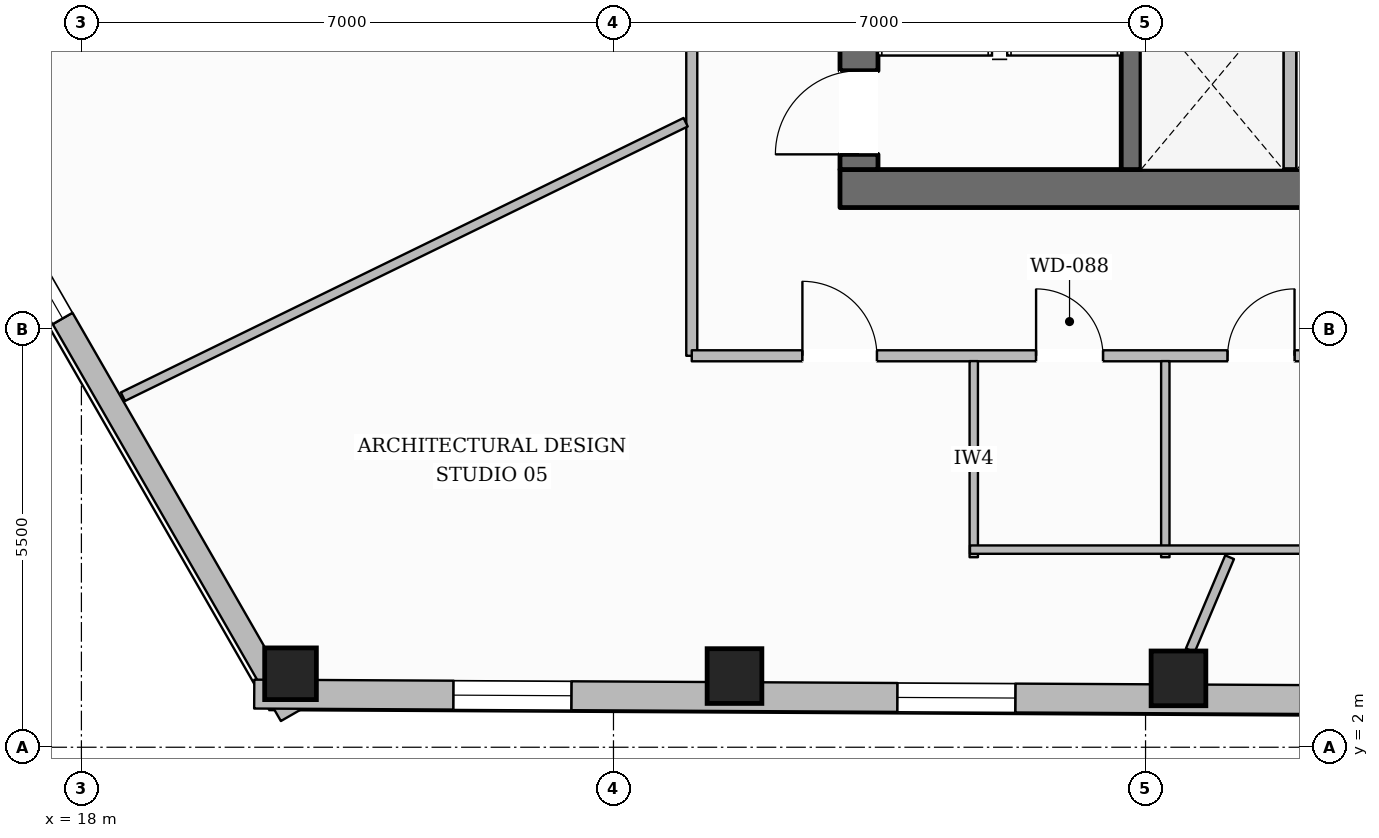
"""IFC4 building model, lengths in metres.
Left out: names, types, materials, properties, quantities, classifications, styles, units other than length and angle.
Written with IfcOpenShell. Run it as: python <this file> out.ifc"""

import sys

from ifc_helpers import new_model, si_unit, direction, frame, frame_2d, origin, origin_2d, place, context, subcontext, project, spatial, rectangle, hollow_rectangle, extrude, element, fill, save


model = new_model("IFC4")
c1 = context("Model", 3, precision=1e-05, world=origin(), true_north=direction((0.0, 1.0)))
c2 = subcontext(c1, "Body", "Model", "MODEL_VIEW")
j1 = project(units=[si_unit("LENGTHUNIT", "METRE"), si_unit("PLANEANGLEUNIT", "RADIAN")], contexts=[c1])
p1 = place(None, origin())
s1 = spatial("IfcSite", under=j1, at=p1, CompositionType="ELEMENT")
p2 = place(p1, origin())
s2 = spatial("IfcBuilding", under=s1, at=p2, CompositionType="ELEMENT")
p3 = place(p2, frame((0.0, 0.0, 108.6)))
s3 = spatial("IfcBuildingStorey", under=s2, at=p3, CompositionType="ELEMENT", Elevation=108.6)
p4 = place(p3, frame((27.98, 9.35, 0.0), z_axis=(0.0, 0.0, 1.0), x_axis=(1.0, 0.0, 0.0)))
e1 = element("IfcWall", 1, at=p4, inside=s3, PredefinedType="SOLIDWALL", context=c2, shape_type="SweptSolid", body=[
    extrude(rectangle(XDim=20.04, YDim=0.5, at=frame_2d((10.02, 0.0))), origin(), (0.0, 0.0, 1.0), 3.6),
])
p5 = place(p4, frame((10.52, 0.0, 0.0)))
e2 = element("IfcOpeningElement", 2, at=p5, cuts=e1, PredefinedType="OPENING", context=c2, shape_type="SweptSolid", body=[
    extrude(rectangle(XDim=1.4, YDim=2.2, at=frame_2d((0.7, 1.1))), frame((0.0, 0.26, 0.0), z_axis=(0.0, -1.0, 0.0), x_axis=(1.0, 0.0, 0.0)), (0.0, 0.0, 1.0), 0.52),
])
p6 = place(p3, frame((28.23, 9.6, 0.0), z_axis=(0.0, 0.0, 1.0), x_axis=(0.0, 1.0, 0.0)))
e3 = element("IfcWall", 3, at=p6, inside=s3, PredefinedType="SOLIDWALL", context=c2, shape_type="SweptSolid", body=[
    extrude(rectangle(XDim=13.0, YDim=0.5, at=frame_2d((6.5, 0.0))), origin(), (0.0, 0.0, 1.0), 3.6),
])
p7 = place(p6, frame((0.2, 0.0, 0.0)))
e4 = element("IfcOpeningElement", 4, at=p7, cuts=e3, PredefinedType="OPENING", context=c2, shape_type="SweptSolid", body=[
    extrude(rectangle(XDim=1.1, YDim=2.15, at=frame_2d((0.55, 1.075))), frame((0.0, 0.26, 0.0), z_axis=(0.0, -1.0, 0.0), x_axis=(1.0, 0.0, 0.0)), (0.0, 0.0, 1.0), 0.52),
])
p8 = place(p6, frame((8.4, 0.0, 0.0)))
e5 = element("IfcOpeningElement", 5, at=p8, cuts=e3, PredefinedType="OPENING", context=c2, shape_type="SweptSolid", body=[
    extrude(rectangle(XDim=0.9, YDim=2.1, at=frame_2d((0.45, 1.05))), frame((0.0, 0.26, 0.0), z_axis=(0.0, -1.0, 0.0), x_axis=(1.0, 0.0, 0.0)), (0.0, 0.0, 1.0), 0.52),
])
p9 = place(p3, frame((31.81, 9.6, 0.0), z_axis=(0.0, 0.0, 1.0), x_axis=(0.0, 1.0, 0.0)))
e6 = element("IfcWall", 6, at=p9, inside=s3, PredefinedType="SHEAR", context=c2, shape_type="SweptSolid", body=[
    extrude(rectangle(XDim=13.0, YDim=0.26, at=frame_2d((6.5, 0.0))), origin(), (0.0, 0.0, 1.0), 3.6),
])
p10 = place(p9, frame((10.925, 0.0, 0.0)))
e7 = element("IfcOpeningElement", 7, at=p10, cuts=e6, PredefinedType="OPENING", context=c2, shape_type="SweptSolid", body=[
    extrude(rectangle(XDim=1.25, YDim=2.25, at=frame_2d((0.625, 1.125))), frame((0.0, 0.14, 0.0), z_axis=(0.0, -1.0, 0.0), x_axis=(1.0, 0.0, 0.0)), (0.0, 0.0, 1.0), 0.28),
])
p11 = place(p3, frame((20.751, 2.967, 0.0), z_axis=(0.0, 0.0, 1.0), x_axis=(1.0, 0.0, 0.0)))
e8 = element("IfcColumn", 8, at=p11, inside=s3, PredefinedType="COLUMN", context=c2, shape_type="SweptSolid", body=[
    extrude(hollow_rectangle(XDim=0.68, YDim=0.68, WallThickness=0.03, at=origin_2d()), origin(), (0.0, 0.0, 1.0), 3.6),
])
for number, where, z_axis, x_axis in (
    (9, (26.592, 2.937, 0.0), (0.0, 0.0, 1.0), (1.0, 0.0, 0.0)),
    (10, (32.433, 2.906, 0.0), (0.0, 0.0, 1.0), (1.0, 0.0, 0.0)),
):
    element("IfcColumn", number, at=place(p3, frame(where, z_axis=z_axis, x_axis=x_axis)), inside=s3, PredefinedType="COLUMN", context=c2, shape_type="SweptSolid", body=[
        extrude(hollow_rectangle(XDim=0.72, YDim=0.72, WallThickness=0.032, at=origin_2d()), origin(), (0.0, 0.0, 1.0), 3.6),
    ])
p12 = place(p3, frame((20.754, 2.419, 0.0), z_axis=(0.0, 0.0, 1.0), x_axis=(-0.49837034912, 0.866964240969, 0.0)))
e11 = element("IfcWall", 11, at=p12, inside=s3, PredefinedType="STANDARD", context=c2, shape_type="SweptSolid", body=[
    extrude(rectangle(XDim=13.246, YDim=0.3, at=frame_2d((6.623, 0.0))), origin(), (0.0, 0.0, 1.0), 3.059),
])
p13 = place(p12, frame((6.023, 0.0, 0.65)))
e12 = element("IfcOpeningElement", 12, at=p13, cuts=e11, PredefinedType="OPENING", context=c2, shape_type="SweptSolid", body=[
    extrude(rectangle(XDim=1.2, YDim=1.7, at=frame_2d((0.6, 0.85))), frame((0.0, 0.16, 0.0), z_axis=(0.0, -1.0, 0.0), x_axis=(1.0, 0.0, 0.0)), (0.0, 0.0, 1.0), 0.32),
])
p14 = place(p3, frame((56.277, 2.512, 0.0), z_axis=(0.0, 0.0, 1.0), x_axis=(-0.999986545033, 0.005187461141, 0.0)))
e13 = element("IfcWall", 13, at=p14, inside=s3, PredefinedType="STANDARD", context=c2, shape_type="SweptSolid", body=[
    extrude(rectangle(XDim=36.004, YDim=0.38, at=frame_2d((18.002, 0.0))), origin(), (0.0, 0.0, 1.0), 3.059),
])
p15 = place(p14, frame((31.832, 0.0, 0.65)))
e14 = element("IfcOpeningElement", 14, at=p15, cuts=e13, PredefinedType="OPENING", context=c2, shape_type="SweptSolid", body=[
    extrude(rectangle(XDim=1.55, YDim=1.75, at=frame_2d((0.775, 0.875))), frame((0.0, 0.2, 0.0), z_axis=(0.0, -1.0, 0.0), x_axis=(1.0, 0.0, 0.0)), (0.0, 0.0, 1.0), 0.4),
])
p16 = place(p14, frame((25.991, 0.0, 0.65)))
e15 = element("IfcOpeningElement", 15, at=p16, cuts=e13, PredefinedType="OPENING", context=c2, shape_type="SweptSolid", body=[
    extrude(rectangle(XDim=1.55, YDim=1.75, at=frame_2d((0.775, 0.875))), frame((0.0, 0.2, 0.0), z_axis=(0.0, -1.0, 0.0), x_axis=(1.0, 0.0, 0.0)), (0.0, 0.0, 1.0), 0.4),
])
p17 = place(p14, frame((14.309, 0.0, 0.65)))
e16 = element("IfcOpeningElement", 16, at=p17, cuts=e13, PredefinedType="OPENING", context=c2, shape_type="SweptSolid", body=[
    extrude(rectangle(XDim=1.55, YDim=1.75, at=frame_2d((0.775, 0.875))), frame((0.0, 0.2, 0.0), z_axis=(0.0, -1.0, 0.0), x_axis=(1.0, 0.0, 0.0)), (0.0, 0.0, 1.0), 0.4),
])
p18 = place(p14, frame((8.468, 0.0, 0.65)))
e17 = element("IfcOpeningElement", 17, at=p18, cuts=e13, PredefinedType="OPENING", context=c2, shape_type="SweptSolid", body=[
    extrude(rectangle(XDim=1.55, YDim=1.75, at=frame_2d((0.775, 0.875))), frame((0.0, 0.2, 0.0), z_axis=(0.0, -1.0, 0.0), x_axis=(1.0, 0.0, 0.0)), (0.0, 0.0, 1.0), 0.4),
])
p19 = place(p14, frame((2.627, 0.0, 0.65)))
e18 = element("IfcOpeningElement", 18, at=p19, cuts=e13, PredefinedType="OPENING", context=c2, shape_type="SweptSolid", body=[
    extrude(rectangle(XDim=1.55, YDim=1.75, at=frame_2d((0.775, 0.875))), frame((0.0, 0.2, 0.0), z_axis=(0.0, -1.0, 0.0), x_axis=(1.0, 0.0, 0.0)), (0.0, 0.0, 1.0), 0.4),
])
p20 = place(p3, frame((33.9, 9.55, 0.0), z_axis=(0.0, 0.0, 1.0), x_axis=(0.0, 1.0, 0.0)))
e19 = element("IfcWall", 19, at=p20, inside=s3, PredefinedType="PARTITIONING", context=c2, shape_type="SweptSolid", body=[
    extrude(rectangle(XDim=2.29, YDim=0.165, at=frame_2d((1.145, 0.0))), origin(), (0.0, 0.0, 1.0), 3.6),
])
p21 = place(p3, frame((26.03, 25.05, 0.0), z_axis=(0.0, 0.0, 1.0), x_axis=(0.0, -1.0, 0.0)))
e20 = element("IfcWall", 20, at=p21, inside=s3, PredefinedType="PARTITIONING", context=c2, shape_type="SweptSolid", body=[
    extrude(rectangle(XDim=17.9, YDim=0.145, at=frame_2d((8.95, 0.0))), origin(), (0.0, 0.0, 1.0), 3.288),
])
p22 = place(p21, frame((7.016, 0.0, 0.0)))
e21 = element("IfcOpeningElement", 21, at=p22, cuts=e20, PredefinedType="OPENING", context=c2, shape_type="SweptSolid", body=[
    extrude(rectangle(XDim=1.4, YDim=2.2, at=frame_2d((0.7, 1.1))), frame((0.0, 0.083, 0.0), z_axis=(0.0, -1.0, 0.0), x_axis=(1.0, 0.0, 0.0)), (0.0, 0.0, 1.0), 0.165),
])
p23 = place(p3, frame((26.03, 7.15, 0.0), z_axis=(0.0, 0.0, 1.0), x_axis=(1.0, 0.0, 0.0)))
e22 = element("IfcWall", 22, at=p23, inside=s3, PredefinedType="PARTITIONING", context=c2, shape_type="SweptSolid", body=[
    extrude(rectangle(XDim=23.94, YDim=0.145, at=frame_2d((11.97, 0.0))), origin(), (0.0, 0.0, 1.0), 3.6),
])
p24 = place(p23, frame((4.53, 0.0, 0.0)))
e23 = element("IfcOpeningElement", 23, at=p24, cuts=e22, PredefinedType="OPENING", context=c2, shape_type="SweptSolid", body=[
    extrude(rectangle(XDim=0.88, YDim=2.1, at=frame_2d((0.44, 1.05))), frame((0.0, 0.083, 0.0), z_axis=(0.0, -1.0, 0.0), x_axis=(1.0, 0.0, 0.0)), (0.0, 0.0, 1.0), 0.165),
])
p25 = place(p23, frame((7.05, 0.0, 0.0)))
e24 = element("IfcOpeningElement", 24, at=p25, cuts=e22, PredefinedType="OPENING", context=c2, shape_type="SweptSolid", body=[
    extrude(rectangle(XDim=0.88, YDim=2.1, at=frame_2d((0.44, 1.05))), frame((0.0, 0.083, 0.0), z_axis=(0.0, -1.0, 0.0), x_axis=(1.0, 0.0, 0.0)), (0.0, 0.0, 1.0), 0.165),
])
p26 = place(p23, frame((9.43, 0.0, 0.0)))
e25 = element("IfcOpeningElement", 25, at=p26, cuts=e22, PredefinedType="OPENING", context=c2, shape_type="SweptSolid", body=[
    extrude(rectangle(XDim=0.96, YDim=2.1, at=frame_2d((0.48, 1.05))), frame((0.0, 0.083, 0.0), z_axis=(0.0, -1.0, 0.0), x_axis=(1.0, 0.0, 0.0)), (0.0, 0.0, 1.0), 0.165),
])
p27 = place(p23, frame((1.456, 0.0, 0.0)))
e26 = element("IfcOpeningElement", 26, at=p27, cuts=e22, PredefinedType="OPENING", context=c2, shape_type="SweptSolid", body=[
    extrude(rectangle(XDim=0.98, YDim=2.15, at=frame_2d((0.49, 1.075))), frame((0.0, 0.083, 0.0), z_axis=(0.0, -1.0, 0.0), x_axis=(1.0, 0.0, 0.0)), (0.0, 0.0, 1.0), 0.165),
])
p28 = place(p23, frame((16.714, 0.0, 0.0)))
e27 = element("IfcOpeningElement", 27, at=p28, cuts=e22, PredefinedType="OPENING", context=c2, shape_type="SweptSolid", body=[
    extrude(rectangle(XDim=1.4, YDim=2.2, at=frame_2d((0.7, 1.1))), frame((0.0, 0.083, 0.0), z_axis=(0.0, -1.0, 0.0), x_axis=(1.0, 0.0, 0.0)), (0.0, 0.0, 1.0), 0.165),
])
p29 = place(p3, frame((29.74, 4.5, 0.0), z_axis=(0.0, 0.0, 1.0), x_axis=(0.0, 1.0, 0.0)))
e28 = element("IfcWall", 28, at=p29, inside=s3, PredefinedType="PLUMBINGWALL", context=c2, shape_type="SweptSolid", body=[
    extrude(rectangle(XDim=2.58, YDim=0.11, at=frame_2d((1.29, 0.0))), origin(), (0.0, 0.0, 1.0), 3.6),
])
p30 = place(p3, frame((32.26, 4.5, 0.0), z_axis=(0.0, 0.0, 1.0), x_axis=(0.0, 1.0, 0.0)))
e29 = element("IfcWall", 29, at=p30, inside=s3, PredefinedType="PLUMBINGWALL", context=c2, shape_type="SweptSolid", body=[
    extrude(rectangle(XDim=2.58, YDim=0.11, at=frame_2d((1.29, 0.0))), origin(), (0.0, 0.0, 1.0), 3.141),
])
p31 = place(p3, frame((29.69, 4.6, 0.0), z_axis=(0.0, 0.0, 1.0), x_axis=(1.0, 0.0, 0.0)))
e30 = element("IfcWall", 30, at=p31, inside=s3, PredefinedType="PLUMBINGWALL", context=c2, shape_type="SweptSolid", body=[
    extrude(rectangle(XDim=7.46, YDim=0.11, at=frame_2d((3.73, 0.0))), origin(), (0.0, 0.0, 1.0), 3.6),
])
p32 = place(p3, frame((25.949, 10.223, 0.0), z_axis=(0.0, 0.0, 1.0), x_axis=(-0.898788385453, -0.438382753054, 0.0)))
e31 = element("IfcWall", 31, at=p32, inside=s3, PredefinedType="PARTITIONING", context=c2, shape_type="SweptSolid", body=[
    extrude(rectangle(XDim=8.237, YDim=0.125, at=frame_2d((4.118, 0.0))), origin(), (0.0, 0.0, 1.0), 3.6),
])
p33 = place(p3, frame((33.106, 4.5, 0.0), z_axis=(0.0, 0.0, 1.0), x_axis=(-0.388819762507, -0.921313840276, 0.0)))
e32 = element("IfcWall", 32, at=p33, inside=s3, PredefinedType="PARTITIONING", context=c2, shape_type="SweptSolid", body=[
    extrude(rectangle(XDim=1.331, YDim=0.125, at=frame_2d((0.665, 0.0))), origin(), (0.0, 0.0, 1.0), 3.6),
])
p34 = place(p15, origin())
e33 = element("IfcWindow", 33, at=p34, inside=s3, PartitioningType="SINGLE_PANEL", PredefinedType="WINDOW", context=c2, shape_type="SweptSolid", body=[
    extrude(rectangle(XDim=1.55, YDim=1.75, at=frame_2d((0.775, 0.875))), frame((0.0, 0.03, 0.0), z_axis=(0.0, -1.0, 0.0), x_axis=(1.0, 0.0, 0.0)), (0.0, 0.0, 1.0), 0.06),
])
fill(e14, e33)
p35 = place(p16, origin())
e34 = element("IfcWindow", 34, at=p35, inside=s3, PartitioningType="SINGLE_PANEL", PredefinedType="WINDOW", context=c2, shape_type="SweptSolid", body=[
    extrude(rectangle(XDim=1.55, YDim=1.75, at=frame_2d((0.775, 0.875))), frame((0.0, 0.03, 0.0), z_axis=(0.0, -1.0, 0.0), x_axis=(1.0, 0.0, 0.0)), (0.0, 0.0, 1.0), 0.06),
])
fill(e15, e34)
p36 = place(p13, origin())
e35 = element("IfcWindow", 35, at=p36, inside=s3, PartitioningType="SINGLE_PANEL", PredefinedType="WINDOW", context=c2, shape_type="SweptSolid", body=[
    extrude(rectangle(XDim=1.2, YDim=1.7, at=frame_2d((0.6, 0.85))), frame((0.0, 0.03, 0.0), z_axis=(0.0, -1.0, 0.0), x_axis=(1.0, 0.0, 0.0)), (0.0, 0.0, 1.0), 0.06),
])
fill(e12, e35)
p37 = place(p7, origin())
e36 = element("IfcDoor", 36, at=p37, inside=s3, OperationType="SINGLE_SWING_LEFT", PredefinedType="DOOR", context=c2, shape_type="SweptSolid", body=[
    extrude(rectangle(XDim=1.1, YDim=2.15, at=frame_2d((0.55, 1.075))), frame((0.0, 0.025, 0.0), z_axis=(0.0, -1.0, 0.0), x_axis=(1.0, 0.0, 0.0)), (0.0, 0.0, 1.0), 0.05),
])
fill(e4, e36)
p38 = place(p24, origin())
e37 = element("IfcDoor", 37, at=p38, inside=s3, OperationType="SINGLE_SWING_LEFT", PredefinedType="DOOR", context=c2, shape_type="SweptSolid", body=[
    extrude(rectangle(XDim=0.88, YDim=2.1, at=frame_2d((0.44, 1.05))), frame((0.0, 0.025, 0.0), z_axis=(0.0, -1.0, 0.0), x_axis=(1.0, 0.0, 0.0)), (0.0, 0.0, 1.0), 0.05),
])
fill(e23, e37)
p39 = place(p25, origin())
e38 = element("IfcDoor", 38, at=p39, inside=s3, OperationType="SINGLE_SWING_RIGHT", PredefinedType="DOOR", context=c2, shape_type="SweptSolid", body=[
    extrude(rectangle(XDim=0.88, YDim=2.1, at=frame_2d((0.44, 1.05))), frame((0.0, 0.025, 0.0), z_axis=(0.0, -1.0, 0.0), x_axis=(1.0, 0.0, 0.0)), (0.0, 0.0, 1.0), 0.05),
])
fill(e24, e38)
p40 = place(p27, origin())
e39 = element("IfcDoor", 39, at=p40, inside=s3, OperationType="SINGLE_SWING_LEFT", PredefinedType="DOOR", context=c2, shape_type="SweptSolid", body=[
    extrude(rectangle(XDim=0.98, YDim=2.15, at=frame_2d((0.49, 1.075))), frame((0.0, 0.025, 0.0), z_axis=(0.0, -1.0, 0.0), x_axis=(1.0, 0.0, 0.0)), (0.0, 0.0, 1.0), 0.05),
])
fill(e26, e39)
save(model, sys.argv[1])
